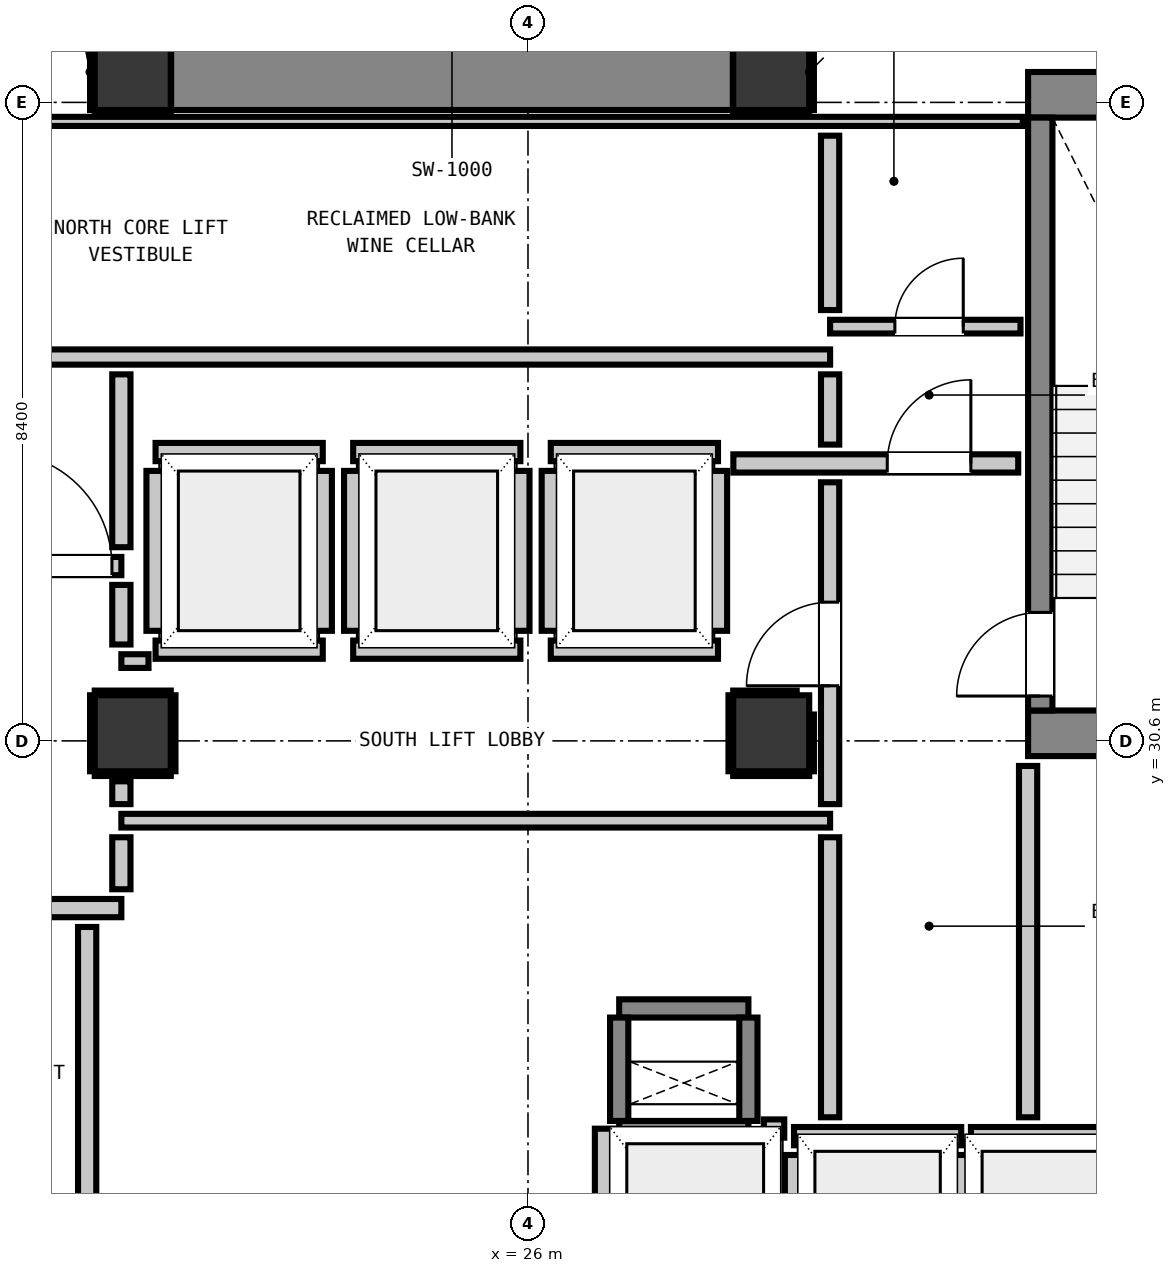
"""IFC4 building model, lengths in metres.
Left out: names, types, materials, properties, quantities, classifications, styles, units other than length and angle.
Written with IfcOpenShell. Run it as: python <this file> out.ifc"""

import sys

from ifc_helpers import new_model, si_unit, direction, frame, frame_2d, origin, origin_2d, place, context, subcontext, project, spatial, rectangle, extrude, element, fill, save


model = new_model("IFC4")
c1 = context("Model", 3, precision=1e-05, world=origin(), true_north=direction((0.0, 1.0)))
c2 = subcontext(c1, "Body", "Model", "MODEL_VIEW")
j1 = project(units=[si_unit("LENGTHUNIT", "METRE"), si_unit("PLANEANGLEUNIT", "RADIAN")], contexts=[c1])
p1 = place(None, origin())
s1 = spatial("IfcSite", under=j1, at=p1, CompositionType="ELEMENT")
p2 = place(p1, origin())
s2 = spatial("IfcBuilding", under=s1, at=p2, CompositionType="ELEMENT")
p3 = place(p2, frame((0.0, 0.0, 145.92)))
s3 = spatial("IfcBuildingStorey", under=s2, at=p3, CompositionType="ELEMENT", Elevation=145.92)
for number, where, z_axis, x_axis in (
    (1, (20.8, 39.4, 0.0), (0.0, 0.0, 1.0), (1.0, 0.0, 0.0)),
    (2, (29.2, 39.4, 0.0), (0.0, 0.0, 1.0), (1.0, 0.0, 0.0)),
):
    element("IfcColumn", number, at=place(p3, frame(where, z_axis=z_axis, x_axis=x_axis)), inside=s3, PredefinedType="COLUMN", context=c2, shape_type="SweptSolid", body=[
        extrude(rectangle(XDim=1.0, YDim=1.0, at=origin_2d()), origin(), (0.0, 0.0, 1.0), 3.32),
    ])
p4 = place(p3, frame((32.58, 39.1, 0.0), z_axis=(0.0, 0.0, 1.0), x_axis=(1.0, 0.0, 0.0)))
e3 = element("IfcWall", 3, at=p4, inside=s3, PredefinedType="SHEAR", context=c2, shape_type="SweptSolid", body=[
    extrude(rectangle(XDim=4.08, YDim=0.6, at=frame_2d((2.04, 0.0))), origin(), (0.0, 0.0, 1.0), 3.32),
])
p5 = place(p3, frame((32.58, 30.7, 0.0), z_axis=(0.0, 0.0, 1.0), x_axis=(1.0, 0.0, 0.0)))
e4 = element("IfcWall", 4, at=p5, inside=s3, PredefinedType="SHEAR", context=c2, shape_type="SweptSolid", body=[
    extrude(rectangle(XDim=3.415, YDim=0.6, at=frame_2d((1.708, 0.0))), origin(), (0.0, 0.0, 1.0), 3.32),
])
p6 = place(p3, frame((21.305, 39.4, 0.0), z_axis=(0.0, 0.0, 1.0), x_axis=(1.0, 0.0, 0.0)))
e5 = element("IfcWall", 5, at=p6, inside=s3, PredefinedType="SHEAR", context=c2, shape_type="SweptSolid", body=[
    extrude(rectangle(XDim=7.39, YDim=1.0, at=frame_2d((3.695, 0.0))), origin(), (0.0, 0.0, 1.0), 3.32),
])
p7 = place(p3, frame((32.74, 31.0, 0.0), z_axis=(0.0, 0.0, 1.0), x_axis=(0.0, 1.0, 0.0)))
e6 = element("IfcWall", 6, at=p7, inside=s3, PredefinedType="SHEAR", context=c2, shape_type="SweptSolid", body=[
    extrude(rectangle(XDim=7.8, YDim=0.32, at=frame_2d((3.9, 0.0))), origin(), (0.0, 0.0, 1.0), 3.32),
])
p8 = place(p7, frame((0.19, 0.0, 0.0)))
e7 = element("IfcOpeningElement", 7, at=p8, cuts=e6, PredefinedType="OPENING", context=c2, shape_type="SweptSolid", body=[
    extrude(rectangle(XDim=1.1, YDim=2.15, at=frame_2d((0.55, 1.075))), frame((0.0, 0.17, 0.0), z_axis=(0.0, -1.0, 0.0), x_axis=(1.0, 0.0, 0.0)), (0.0, 0.0, 1.0), 0.34),
])
for number, where, z_axis, x_axis in (
    (8, (27.2, 25.48, 0.0), (0.0, 0.0, 1.0), (1.0, 0.0, 0.0)),
    (9, (27.2, 27.08, 0.0), (0.0, 0.0, 1.0), (1.0, 0.0, 0.0)),
):
    element("IfcWall", number, at=place(p3, frame(where, z_axis=z_axis, x_axis=x_axis)), inside=s3, PredefinedType="SHEAR", context=c2, shape_type="SweptSolid", body=[
        extrude(rectangle(XDim=1.7, YDim=0.24, at=frame_2d((0.85, 0.0))), origin(), (0.0, 0.0, 1.0), 3.32),
    ])
for number, where, z_axis, x_axis in (
    (10, (27.2, 25.6, 0.0), (0.0, 0.0, 1.0), (0.0, 1.0, 0.0)),
    (11, (28.9, 25.6, 0.0), (0.0, 0.0, 1.0), (0.0, 1.0, 0.0)),
):
    element("IfcWall", number, at=place(p3, frame(where, z_axis=z_axis, x_axis=x_axis)), inside=s3, PredefinedType="SHEAR", context=c2, shape_type="SweptSolid", body=[
        extrude(rectangle(XDim=1.36, YDim=0.24, at=frame_2d((0.68, 0.0))), origin(), (0.0, 0.0, 1.0), 3.32),
    ])
for number, where, z_axis, x_axis in (
    (12, (20.8, 30.7, 0.0), (0.0, 0.0, 1.0), (1.0, 0.0, 0.0)),
    (13, (29.2, 30.7, 0.0), (0.0, 0.0, 1.0), (1.0, 0.0, 0.0)),
):
    element("IfcColumn", number, at=place(p3, frame(where, z_axis=z_axis, x_axis=x_axis)), inside=s3, PredefinedType="COLUMN", context=c2, shape_type="SweptSolid", body=[
        extrude(rectangle(XDim=1.0, YDim=1.0, at=origin_2d()), origin(), (0.0, 0.0, 1.0), 3.32),
    ])
for number, where, z_axis, x_axis in (
    (14, (21.1, 31.8, 0.0), (0.0, 0.0, 1.0), (1.0, 0.0, 0.0)),
    (15, (21.1, 34.4, 0.0), (0.0, 0.0, 1.0), (1.0, 0.0, 0.0)),
):
    element("IfcWall", number, at=place(p3, frame(where, z_axis=z_axis, x_axis=x_axis)), inside=s3, PredefinedType="PARTITIONING", context=c2, shape_type="SweptSolid", body=[
        extrude(rectangle(XDim=2.2, YDim=0.24, at=frame_2d((1.1, 0.0))), origin(), (0.0, 0.0, 1.0), 3.08),
    ])
p9 = place(p3, frame((21.1, 32.048, 0.0), z_axis=(0.0, 0.0, 1.0), x_axis=(0.0, 1.0, 0.0)))
e16 = element("IfcWall", 16, at=p9, inside=s3, PredefinedType="PARTITIONING", context=c2, shape_type="SweptSolid", body=[
    extrude(rectangle(XDim=2.104, YDim=0.24, at=frame_2d((1.052, 0.0))), origin(), (0.0, 0.0, 1.0), 2.315),
])
p10 = place(p3, frame((23.3, 32.048, 0.0), z_axis=(0.0, 0.0, 1.0), x_axis=(0.0, 1.0, 0.0)))
e17 = element("IfcWall", 17, at=p10, inside=s3, PredefinedType="PARTITIONING", context=c2, shape_type="SweptSolid", body=[
    extrude(rectangle(XDim=2.104, YDim=0.24, at=frame_2d((1.052, 0.0))), origin(), (0.0, 0.0, 1.0), 3.08),
])
for number, where, z_axis, x_axis in (
    (18, (23.7, 31.8, 0.0), (0.0, 0.0, 1.0), (1.0, 0.0, 0.0)),
    (19, (23.7, 34.4, 0.0), (0.0, 0.0, 1.0), (1.0, 0.0, 0.0)),
):
    element("IfcWall", number, at=place(p3, frame(where, z_axis=z_axis, x_axis=x_axis)), inside=s3, PredefinedType="PARTITIONING", context=c2, shape_type="SweptSolid", body=[
        extrude(rectangle(XDim=2.2, YDim=0.24, at=frame_2d((1.1, 0.0))), origin(), (0.0, 0.0, 1.0), 3.08),
    ])
for number, where, z_axis, x_axis in (
    (20, (23.7, 32.048, 0.0), (0.0, 0.0, 1.0), (0.0, 1.0, 0.0)),
    (21, (25.9, 32.048, 0.0), (0.0, 0.0, 1.0), (0.0, 1.0, 0.0)),
):
    element("IfcWall", number, at=place(p3, frame(where, z_axis=z_axis, x_axis=x_axis)), inside=s3, PredefinedType="PARTITIONING", context=c2, shape_type="SweptSolid", body=[
        extrude(rectangle(XDim=2.104, YDim=0.24, at=frame_2d((1.052, 0.0))), origin(), (0.0, 0.0, 1.0), 3.08),
    ])
for number, where, z_axis, x_axis in (
    (22, (26.3, 31.8, 0.0), (0.0, 0.0, 1.0), (1.0, 0.0, 0.0)),
    (23, (26.3, 34.4, 0.0), (0.0, 0.0, 1.0), (1.0, 0.0, 0.0)),
):
    element("IfcWall", number, at=place(p3, frame(where, z_axis=z_axis, x_axis=x_axis)), inside=s3, PredefinedType="PARTITIONING", context=c2, shape_type="SweptSolid", body=[
        extrude(rectangle(XDim=2.2, YDim=0.24, at=frame_2d((1.1, 0.0))), origin(), (0.0, 0.0, 1.0), 3.08),
    ])
for number, where, z_axis, x_axis in (
    (24, (26.3, 32.048, 0.0), (0.0, 0.0, 1.0), (0.0, 1.0, 0.0)),
    (25, (28.5, 32.048, 0.0), (0.0, 0.0, 1.0), (0.0, 1.0, 0.0)),
):
    element("IfcWall", number, at=place(p3, frame(where, z_axis=z_axis, x_axis=x_axis)), inside=s3, PredefinedType="PARTITIONING", context=c2, shape_type="SweptSolid", body=[
        extrude(rectangle(XDim=2.104, YDim=0.24, at=frame_2d((1.052, 0.0))), origin(), (0.0, 0.0, 1.0), 3.08),
    ])
p11 = place(p3, frame((29.5, 25.4, 0.0), z_axis=(0.0, 0.0, 1.0), x_axis=(1.0, 0.0, 0.0)))
e26 = element("IfcWall", 26, at=p11, inside=s3, PredefinedType="PARTITIONING", context=c2, shape_type="SweptSolid", body=[
    extrude(rectangle(XDim=2.2, YDim=0.24, at=frame_2d((1.1, 0.0))), origin(), (0.0, 0.0, 1.0), 3.08),
])
p12 = place(p3, frame((29.5, 22.632, 0.0), z_axis=(0.0, 0.0, 1.0), x_axis=(0.0, 1.0, 0.0)))
e27 = element("IfcWall", 27, at=p12, inside=s3, PredefinedType="PARTITIONING", context=c2, shape_type="SweptSolid", body=[
    extrude(rectangle(XDim=2.52, YDim=0.24, at=frame_2d((1.26, 0.0))), origin(), (0.0, 0.0, 1.0), 2.315),
])
p13 = place(p3, frame((31.7, 22.63, 0.0), z_axis=(0.0, 0.0, 1.0), x_axis=(0.0, 1.0, 0.0)))
e28 = element("IfcWall", 28, at=p13, inside=s3, PredefinedType="PARTITIONING", context=c2, shape_type="SweptSolid", body=[
    extrude(rectangle(XDim=2.522, YDim=0.24, at=frame_2d((1.261, 0.0))), origin(), (0.0, 0.0, 1.0), 3.08),
])
p14 = place(p3, frame((31.828, 25.4, 0.0), z_axis=(0.0, 0.0, 1.0), x_axis=(1.0, 0.0, 0.0)))
e29 = element("IfcWall", 29, at=p14, inside=s3, PredefinedType="PARTITIONING", context=c2, shape_type="SweptSolid", body=[
    extrude(rectangle(XDim=2.072, YDim=0.24, at=frame_2d((1.036, 0.0))), origin(), (0.0, 0.0, 1.0), 3.08),
])
p15 = place(p3, frame((29.103, 25.5, 0.0), z_axis=(0.0, 0.0, 1.0), x_axis=(1.0, 0.0, 0.0)))
e30 = element("IfcWall", 30, at=p15, inside=s3, PredefinedType="PARTITIONING", context=c2, shape_type="SweptSolid", body=[
    extrude(rectangle(XDim=0.269, YDim=0.24, at=frame_2d((0.135, 0.0))), origin(), (0.0, 0.0, 1.0), 3.08),
])
p16 = place(p3, frame((27.0, 22.63, 0.0), z_axis=(0.0, 0.0, 1.0), x_axis=(0.0, 1.0, 0.0)))
e31 = element("IfcWall", 31, at=p16, inside=s3, PredefinedType="PARTITIONING", context=c2, shape_type="SweptSolid", body=[
    extrude(rectangle(XDim=2.868, YDim=0.24, at=frame_2d((1.434, 0.0))), origin(), (0.0, 0.0, 1.0), 3.08),
])
p17 = place(p3, frame((17.45, 28.4, 0.0), z_axis=(0.0, 0.0, 1.0), x_axis=(1.0, 0.0, 0.0)))
e32 = element("IfcWall", 32, at=p17, inside=s3, PredefinedType="PARTITIONING", context=c2, shape_type="SweptSolid", body=[
    extrude(rectangle(XDim=3.2, YDim=0.24, at=frame_2d((1.6, 0.0))), origin(), (0.0, 0.0, 1.0), 3.08),
])
p18 = place(p17, frame((0.784, 0.0, 0.0)))
e33 = element("IfcOpeningElement", 33, at=p18, cuts=e32, PredefinedType="OPENING", context=c2, shape_type="SweptSolid", body=[
    extrude(rectangle(XDim=1.1, YDim=2.15, at=frame_2d((0.55, 1.075))), frame((0.0, 0.13, 0.0), z_axis=(0.0, -1.0, 0.0), x_axis=(1.0, 0.0, 0.0)), (0.0, 0.0, 1.0), 0.26),
])
p19 = place(p3, frame((17.45, 32.9, 0.0), z_axis=(0.0, 0.0, 1.0), x_axis=(1.0, 0.0, 0.0)))
e34 = element("IfcWall", 34, at=p19, inside=s3, PredefinedType="PARTITIONING", context=c2, shape_type="SweptSolid", body=[
    extrude(rectangle(XDim=3.2, YDim=0.24, at=frame_2d((1.6, 0.0))), origin(), (0.0, 0.0, 1.0), 3.08),
])
p20 = place(p19, frame((0.159, 0.0, 0.0)))
e35 = element("IfcOpeningElement", 35, at=p20, cuts=e34, PredefinedType="OPENING", context=c2, shape_type="SweptSolid", body=[
    extrude(rectangle(XDim=1.1, YDim=2.15, at=frame_2d((0.55, 1.075))), frame((0.0, 0.13, 0.0), z_axis=(0.0, -1.0, 0.0), x_axis=(1.0, 0.0, 0.0)), (0.0, 0.0, 1.0), 0.26),
])
p21 = place(p19, frame((1.576, 0.0, 0.0)))
e36 = element("IfcOpeningElement", 36, at=p21, cuts=e34, PredefinedType="OPENING", context=c2, shape_type="SweptSolid", body=[
    extrude(rectangle(XDim=1.5, YDim=2.15, at=frame_2d((0.75, 1.075))), frame((0.0, 0.13, 0.0), z_axis=(0.0, -1.0, 0.0), x_axis=(1.0, 0.0, 0.0)), (0.0, 0.0, 1.0), 0.26),
])
p22 = place(p3, frame((28.702, 34.25, 0.0), z_axis=(0.0, 0.0, 1.0), x_axis=(1.0, 0.0, 0.0)))
e37 = element("IfcWall", 37, at=p22, inside=s3, PredefinedType="PARTITIONING", context=c2, shape_type="SweptSolid", body=[
    extrude(rectangle(XDim=3.748, YDim=0.24, at=frame_2d((1.874, 0.0))), origin(), (0.0, 0.0, 1.0), 3.08),
])
p23 = place(p22, frame((2.025, 0.0, 0.0)))
e38 = element("IfcOpeningElement", 38, at=p23, cuts=e37, PredefinedType="OPENING", context=c2, shape_type="SweptSolid", body=[
    extrude(rectangle(XDim=1.1, YDim=2.15, at=frame_2d((0.55, 1.075))), frame((0.0, 0.13, 0.0), z_axis=(0.0, -1.0, 0.0), x_axis=(1.0, 0.0, 0.0)), (0.0, 0.0, 1.0), 0.26),
])
p24 = place(p3, frame((18.95, 35.65, 0.0), z_axis=(0.0, 0.0, 1.0), x_axis=(1.0, 0.0, 0.0)))
e39 = element("IfcWall", 39, at=p24, inside=s3, PredefinedType="PARTITIONING", context=c2, shape_type="SweptSolid", body=[
    extrude(rectangle(XDim=11.025, YDim=0.2, at=frame_2d((5.513, 0.0))), origin(), (0.0, 0.0, 1.0), 3.08),
])
p25 = place(p3, frame((20.65, 29.55, 0.0), z_axis=(0.0, 0.0, 1.0), x_axis=(1.0, 0.0, 0.0)))
e40 = element("IfcWall", 40, at=p25, inside=s3, PredefinedType="PARTITIONING", context=c2, shape_type="SweptSolid", body=[
    extrude(rectangle(XDim=9.325, YDim=0.18, at=frame_2d((4.663, 0.0))), origin(), (0.0, 0.0, 1.0), 3.08),
])
p26 = place(p3, frame((20.65, 31.65, 0.0), z_axis=(0.0, 0.0, 1.0), x_axis=(1.0, 0.0, 0.0)))
e41 = element("IfcWall", 41, at=p26, inside=s3, PredefinedType="PARTITIONING", context=c2, shape_type="SweptSolid", body=[
    extrude(rectangle(XDim=0.357, YDim=0.18, at=frame_2d((0.179, 0.0))), origin(), (0.0, 0.0, 1.0), 3.08),
])
p27 = place(p3, frame((29.975, 36.05, 0.0), z_axis=(0.0, 0.0, 1.0), x_axis=(1.0, 0.0, 0.0)))
e42 = element("IfcWall", 42, at=p27, inside=s3, PredefinedType="PARTITIONING", context=c2, shape_type="SweptSolid", body=[
    extrude(rectangle(XDim=2.505, YDim=0.18, at=frame_2d((1.252, 0.0))), origin(), (0.0, 0.0, 1.0), 3.08),
])
p28 = place(p27, frame((0.852, 0.0, 0.0)))
e43 = element("IfcOpeningElement", 43, at=p28, cuts=e42, PredefinedType="OPENING", context=c2, shape_type="SweptSolid", body=[
    extrude(rectangle(XDim=0.9, YDim=2.1, at=frame_2d((0.45, 1.05))), frame((0.0, 0.1, 0.0), z_axis=(0.0, -1.0, 0.0), x_axis=(1.0, 0.0, 0.0)), (0.0, 0.0, 1.0), 0.2),
])
p29 = place(p3, frame((18.95, 38.75, 0.0), z_axis=(0.0, 0.0, 1.0), x_axis=(1.0, 0.0, 0.0)))
e44 = element("IfcWall", 44, at=p29, inside=s3, PredefinedType="PARTITIONING", context=c2, shape_type="SweptSolid", body=[
    extrude(rectangle(XDim=13.56, YDim=0.12, at=frame_2d((6.78, 0.0))), origin(), (0.0, 0.0, 1.0), 3.08),
])
p30 = place(p3, frame((20.2, 22.586, 0.0), z_axis=(0.0, 0.0, 1.0), x_axis=(0.0, 1.0, 0.0)))
e45 = element("IfcWall", 45, at=p30, inside=s3, PredefinedType="PARTITIONING", context=c2, shape_type="SweptSolid", body=[
    extrude(rectangle(XDim=5.566, YDim=0.24, at=frame_2d((2.783, 0.0))), origin(), (0.0, 0.0, 1.0), 3.08),
])
p31 = place(p3, frame((20.65, 28.648, 0.0), z_axis=(0.0, 0.0, 1.0), x_axis=(0.0, 1.0, 0.0)))
e46 = element("IfcWall", 46, at=p31, inside=s3, PredefinedType="PARTITIONING", context=c2, shape_type="SweptSolid", body=[
    extrude(rectangle(XDim=0.684, YDim=0.24, at=frame_2d((0.342, 0.0))), origin(), (0.0, 0.0, 1.0), 2.315),
])
p32 = place(p3, frame((20.65, 29.768, 0.0), z_axis=(0.0, 0.0, 1.0), x_axis=(0.0, 1.0, 0.0)))
e47 = element("IfcWall", 47, at=p32, inside=s3, PredefinedType="PARTITIONING", context=c2, shape_type="SweptSolid", body=[
    extrude(rectangle(XDim=0.3, YDim=0.24, at=frame_2d((0.15, 0.0))), origin(), (0.0, 0.0, 1.0), 2.315),
])
p33 = place(p3, frame((20.65, 31.868, 0.0), z_axis=(0.0, 0.0, 1.0), x_axis=(0.0, 1.0, 0.0)))
e48 = element("IfcWall", 48, at=p33, inside=s3, PredefinedType="PARTITIONING", context=c2, shape_type="SweptSolid", body=[
    extrude(rectangle(XDim=0.784, YDim=0.24, at=frame_2d((0.392, 0.0))), origin(), (0.0, 0.0, 1.0), 2.315),
])
p34 = place(p3, frame((20.65, 33.148, 0.0), z_axis=(0.0, 0.0, 1.0), x_axis=(0.0, 1.0, 0.0)))
e49 = element("IfcWall", 49, at=p34, inside=s3, PredefinedType="PARTITIONING", context=c2, shape_type="SweptSolid", body=[
    extrude(rectangle(XDim=2.274, YDim=0.24, at=frame_2d((1.137, 0.0))), origin(), (0.0, 0.0, 1.0), 2.315),
])
p35 = place(p3, frame((29.975, 25.648, 0.0), z_axis=(0.0, 0.0, 1.0), x_axis=(0.0, 1.0, 0.0)))
e50 = element("IfcWall", 50, at=p35, inside=s3, PredefinedType="PARTITIONING", context=c2, shape_type="SweptSolid", body=[
    extrude(rectangle(XDim=3.684, YDim=0.24, at=frame_2d((1.842, 0.0))), origin(), (0.0, 0.0, 1.0), 3.08),
])
p36 = place(p3, frame((29.975, 29.768, 0.0), z_axis=(0.0, 0.0, 1.0), x_axis=(0.0, 1.0, 0.0)))
e51 = element("IfcWall", 51, at=p36, inside=s3, PredefinedType="PARTITIONING", context=c2, shape_type="SweptSolid", body=[
    extrude(rectangle(XDim=4.234, YDim=0.24, at=frame_2d((2.117, 0.0))), origin(), (0.0, 0.0, 1.0), 3.08),
])
p37 = place(p36, frame((1.557, 0.0, 0.0)))
e52 = element("IfcOpeningElement", 52, at=p37, cuts=e51, PredefinedType="OPENING", context=c2, shape_type="SweptSolid", body=[
    extrude(rectangle(XDim=1.1, YDim=2.15, at=frame_2d((0.55, 1.075))), frame((0.0, 0.13, 0.0), z_axis=(0.0, -1.0, 0.0), x_axis=(1.0, 0.0, 0.0)), (0.0, 0.0, 1.0), 0.26),
])
p38 = place(p3, frame((29.975, 34.498, 0.0), z_axis=(0.0, 0.0, 1.0), x_axis=(0.0, 1.0, 0.0)))
e53 = element("IfcWall", 53, at=p38, inside=s3, PredefinedType="PARTITIONING", context=c2, shape_type="SweptSolid", body=[
    extrude(rectangle(XDim=0.924, YDim=0.24, at=frame_2d((0.462, 0.0))), origin(), (0.0, 0.0, 1.0), 3.08),
])
p39 = place(p3, frame((29.975, 36.268, 0.0), z_axis=(0.0, 0.0, 1.0), x_axis=(0.0, 1.0, 0.0)))
e54 = element("IfcWall", 54, at=p39, inside=s3, PredefinedType="PARTITIONING", context=c2, shape_type="SweptSolid", body=[
    extrude(rectangle(XDim=2.294, YDim=0.24, at=frame_2d((1.147, 0.0))), origin(), (0.0, 0.0, 1.0), 3.08),
])
p40 = place(p3, frame((32.58, 25.648, 0.0), z_axis=(0.0, 0.0, 1.0), x_axis=(0.0, 1.0, 0.0)))
e55 = element("IfcWall", 55, at=p40, inside=s3, PredefinedType="PARTITIONING", context=c2, shape_type="SweptSolid", body=[
    extrude(rectangle(XDim=4.622, YDim=0.24, at=frame_2d((2.311, 0.0))), origin(), (0.0, 0.0, 1.0), 3.08),
])
for number, where, z_axis, x_axis in (
    (56, (20.3, 38.868, 0.0), (0.0, 0.0, 1.0), (1.0, 0.0, 0.0)),
    (57, (20.268, 38.9, 0.0), (0.0, 0.0, 1.0), (0.0, 1.0, 0.0)),
    (58, (28.7, 38.868, 0.0), (0.0, 0.0, 1.0), (1.0, 0.0, 0.0)),
    (59, (29.732, 38.9, 0.0), (0.0, 0.0, 1.0), (0.0, 1.0, 0.0)),
    (60, (20.3, 30.168, 0.0), (0.0, 0.0, 1.0), (1.0, 0.0, 0.0)),
    (61, (20.3, 31.232, 0.0), (0.0, 0.0, 1.0), (1.0, 0.0, 0.0)),
    (62, (20.268, 30.2, 0.0), (0.0, 0.0, 1.0), (0.0, 1.0, 0.0)),
    (63, (21.332, 30.2, 0.0), (0.0, 0.0, 1.0), (0.0, 1.0, 0.0)),
    (64, (28.7, 30.168, 0.0), (0.0, 0.0, 1.0), (1.0, 0.0, 0.0)),
):
    element("IfcWall", number, at=place(p3, frame(where, z_axis=z_axis, x_axis=x_axis)), inside=s3, PredefinedType="PARTITIONING", context=c2, shape_type="SweptSolid", body=[
        extrude(rectangle(XDim=1.0, YDim=0.06, at=frame_2d((0.5, 0.0))), origin(), (0.0, 0.0, 1.0), 1.45),
    ])
p41 = place(p3, frame((28.7, 31.232, 0.0), z_axis=(0.0, 0.0, 1.0), x_axis=(1.0, 0.0, 0.0)))
e65 = element("IfcWall", 65, at=p41, inside=s3, PredefinedType="PARTITIONING", context=c2, shape_type="SweptSolid", body=[
    extrude(rectangle(XDim=0.835, YDim=0.06, at=frame_2d((0.417, 0.0))), origin(), (0.0, 0.0, 1.0), 1.45),
])
p42 = place(p3, frame((28.668, 30.2, 0.0), z_axis=(0.0, 0.0, 1.0), x_axis=(0.0, 1.0, 0.0)))
e66 = element("IfcWall", 66, at=p42, inside=s3, PredefinedType="PARTITIONING", context=c2, shape_type="SweptSolid", body=[
    extrude(rectangle(XDim=1.0, YDim=0.06, at=frame_2d((0.5, 0.0))), origin(), (0.0, 0.0, 1.0), 1.45),
])
p43 = place(p3, frame((29.732, 30.2, 0.0), z_axis=(0.0, 0.0, 1.0), x_axis=(0.0, 1.0, 0.0)))
e67 = element("IfcWall", 67, at=p43, inside=s3, PredefinedType="PARTITIONING", context=c2, shape_type="SweptSolid", body=[
    extrude(rectangle(XDim=0.747, YDim=0.06, at=frame_2d((0.374, 0.0))), origin(), (0.0, 0.0, 1.0), 1.45),
])
p44 = place(p8, origin())
e68 = element("IfcDoor", 68, at=p44, inside=s3, OperationType="SINGLE_SWING_LEFT", PredefinedType="DOOR", context=c2, shape_type="SweptSolid", body=[
    extrude(rectangle(XDim=1.1, YDim=2.15, at=frame_2d((0.55, 1.075))), frame((0.0, 0.025, 0.0), z_axis=(0.0, -1.0, 0.0), x_axis=(1.0, 0.0, 0.0)), (0.0, 0.0, 1.0), 0.05),
])
fill(e7, e68)
p45 = place(p37, origin())
e69 = element("IfcDoor", 69, at=p45, inside=s3, OperationType="SINGLE_SWING_LEFT", PredefinedType="DOOR", context=c2, shape_type="SweptSolid", body=[
    extrude(rectangle(XDim=1.1, YDim=2.15, at=frame_2d((0.55, 1.075))), frame((0.0, 0.025, 0.0), z_axis=(0.0, -1.0, 0.0), x_axis=(1.0, 0.0, 0.0)), (0.0, 0.0, 1.0), 0.05),
])
fill(e52, e69)
p46 = place(p23, origin())
e70 = element("IfcDoor", 70, at=p46, inside=s3, OperationType="SINGLE_SWING_RIGHT", PredefinedType="DOOR", context=c2, shape_type="SweptSolid", body=[
    extrude(rectangle(XDim=1.1, YDim=2.15, at=frame_2d((0.55, 1.075))), frame((0.0, 0.025, 0.0), z_axis=(0.0, -1.0, 0.0), x_axis=(1.0, 0.0, 0.0)), (0.0, 0.0, 1.0), 0.05),
])
fill(e38, e70)
p47 = place(p21, origin())
e71 = element("IfcDoor", 71, at=p47, inside=s3, OperationType="SINGLE_SWING_LEFT", PredefinedType="DOOR", context=c2, shape_type="SweptSolid", body=[
    extrude(rectangle(XDim=1.5, YDim=2.15, at=frame_2d((0.75, 1.075))), frame((0.0, 0.025, 0.0), z_axis=(0.0, -1.0, 0.0), x_axis=(1.0, 0.0, 0.0)), (0.0, 0.0, 1.0), 0.05),
])
fill(e36, e71)
p48 = place(p28, origin())
e72 = element("IfcDoor", 72, at=p48, inside=s3, OperationType="SINGLE_SWING_RIGHT", PredefinedType="DOOR", context=c2, shape_type="SweptSolid", body=[
    extrude(rectangle(XDim=0.9, YDim=2.1, at=frame_2d((0.45, 1.05))), frame((0.0, 0.025, 0.0), z_axis=(0.0, -1.0, 0.0), x_axis=(1.0, 0.0, 0.0)), (0.0, 0.0, 1.0), 0.05),
])
fill(e43, e72)
save(model, sys.argv[1])
